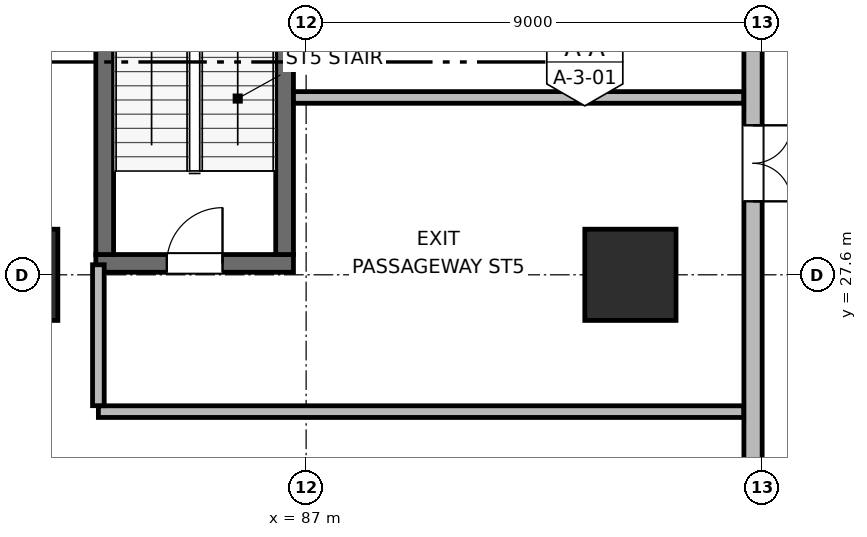
"""IFC4 building model, lengths in metres.
Left out: names, types, materials, properties, quantities, classifications, styles, units other than length and angle.
Written with IfcOpenShell. Run it as: python <this file> out.ifc"""

import sys

from ifc_helpers import new_model, si_unit, direction, frame, frame_2d, origin, origin_2d, place, context, subcontext, project, spatial, rectangle, extrude, element, fill, save


model = new_model("IFC4")
c1 = context("Model", 3, precision=1e-05, world=origin(), true_north=direction((0.0, 1.0)))
c2 = subcontext(c1, "Body", "Model", "MODEL_VIEW")
j1 = project(units=[si_unit("LENGTHUNIT", "METRE"), si_unit("PLANEANGLEUNIT", "RADIAN")], contexts=[c1])
p1 = place(None, origin())
s1 = spatial("IfcSite", under=j1, at=p1, CompositionType="ELEMENT")
p2 = place(p1, origin())
s2 = spatial("IfcBuilding", under=s1, at=p2, CompositionType="ELEMENT")
p3 = place(p2, origin())
s3 = spatial("IfcBuildingStorey", under=s2, at=p3, CompositionType="ELEMENT", Elevation=0.0)
p4 = place(p3, frame((82.85, 27.825, 0.0), z_axis=(0.0, 0.0, 1.0), x_axis=(1.0, 0.0, 0.0)))
e1 = element("IfcWall", 1, at=p4, inside=s3, PredefinedType="SHEAR", context=c2, shape_type="SweptSolid", body=[
    extrude(rectangle(XDim=3.9, YDim=0.35, at=frame_2d((1.95, 0.0))), origin(), (0.0, 0.0, 1.0), 4.5),
])
p5 = place(p4, frame((1.4, 0.0, 0.0)))
e2 = element("IfcOpeningElement", 2, at=p5, cuts=e1, PredefinedType="OPENING", context=c2, shape_type="SweptSolid", body=[
    extrude(rectangle(XDim=1.1, YDim=2.05, at=frame_2d((0.55, 1.025))), frame((0.0, 0.185, 0.0), z_axis=(0.0, -1.0, 0.0), x_axis=(1.0, 0.0, 0.0)), (0.0, 0.0, 1.0), 0.37),
])
for number, where, z_axis, x_axis in (
    (3, (83.025, 28.0, 0.0), (0.0, 0.0, 1.0), (0.0, 1.0, 0.0)),
    (4, (86.575, 28.0, 0.0), (0.0, 0.0, 1.0), (0.0, 1.0, 0.0)),
):
    element("IfcWall", number, at=place(p3, frame(where, z_axis=z_axis, x_axis=x_axis)), inside=s3, PredefinedType="SHEAR", context=c2, shape_type="SweptSolid", body=[
        extrude(rectangle(XDim=8.4, YDim=0.35, at=frame_2d((4.2, 0.0))), origin(), (0.0, 0.0, 1.0), 4.5),
    ])
for number, where, z_axis, x_axis in (
    (5, (81.2, 27.6, 0.0), (0.0, 0.0, 1.0), (1.0, 0.0, 0.0)),
    (6, (93.4, 27.6, 0.0), (0.0, 0.0, 1.0), (1.0, 0.0, 0.0)),
):
    element("IfcColumn", number, at=place(p3, frame(where, z_axis=z_axis, x_axis=x_axis)), inside=s3, PredefinedType="COLUMN", context=c2, shape_type="SweptSolid", body=[
        extrude(rectangle(XDim=1.8, YDim=1.8, at=origin_2d()), origin(), (0.0, 0.0, 1.0), 4.5),
    ])
p6 = place(p3, frame((95.82, 71.64, 0.0), z_axis=(0.0, 0.0, 1.0), x_axis=(0.0, -1.0, 0.0)))
e7 = element("IfcWall", 7, at=p6, inside=s3, PredefinedType="SOLIDWALL", context=c2, shape_type="SweptSolid", body=[
    extrude(rectangle(XDim=71.28, YDim=0.36, at=frame_2d((35.64, 0.0))), origin(), (0.0, 0.0, 1.0), 4.18),
])
p7 = place(p6, frame((12.0, 0.0, 0.0)))
e8 = element("IfcOpeningElement", 8, at=p7, cuts=e7, PredefinedType="OPENING", context=c2, shape_type="SweptSolid", body=[
    extrude(rectangle(XDim=4.2, YDim=2.8, at=frame_2d((2.1, 1.4))), frame((0.0, 0.19, 0.0), z_axis=(0.0, -1.0, 0.0), x_axis=(1.0, 0.0, 0.0)), (0.0, 0.0, 1.0), 0.38),
])
p8 = place(p6, frame((20.0, 0.0, 0.0)))
e9 = element("IfcOpeningElement", 9, at=p8, cuts=e7, PredefinedType="OPENING", context=c2, shape_type="SweptSolid", body=[
    extrude(rectangle(XDim=4.2, YDim=2.8, at=frame_2d((2.1, 1.4))), frame((0.0, 0.19, 0.0), z_axis=(0.0, -1.0, 0.0), x_axis=(1.0, 0.0, 0.0)), (0.0, 0.0, 1.0), 0.38),
])
p9 = place(p6, frame((50.0, 0.0, 0.0)))
e10 = element("IfcOpeningElement", 10, at=p9, cuts=e7, PredefinedType="OPENING", context=c2, shape_type="SweptSolid", body=[
    extrude(rectangle(XDim=4.2, YDim=2.8, at=frame_2d((2.1, 1.4))), frame((0.0, 0.19, 0.0), z_axis=(0.0, -1.0, 0.0), x_axis=(1.0, 0.0, 0.0)), (0.0, 0.0, 1.0), 0.38),
])
p10 = place(p6, frame((58.0, 0.0, 0.0)))
e11 = element("IfcOpeningElement", 11, at=p10, cuts=e7, PredefinedType="OPENING", context=c2, shape_type="SweptSolid", body=[
    extrude(rectangle(XDim=4.2, YDim=2.8, at=frame_2d((2.1, 1.4))), frame((0.0, 0.19, 0.0), z_axis=(0.0, -1.0, 0.0), x_axis=(1.0, 0.0, 0.0)), (0.0, 0.0, 1.0), 0.38),
])
p11 = place(p6, frame((28.29, 0.0, 0.0)))
e12 = element("IfcOpeningElement", 12, at=p11, cuts=e7, PredefinedType="OPENING", context=c2, shape_type="SweptSolid", body=[
    extrude(rectangle(XDim=1.5, YDim=2.15, at=frame_2d((0.75, 1.075))), frame((0.0, 0.19, 0.0), z_axis=(0.0, -1.0, 0.0), x_axis=(1.0, 0.0, 0.0)), (0.0, 0.0, 1.0), 0.38),
])
p12 = place(p6, frame((41.09, 0.0, 0.0)))
e13 = element("IfcOpeningElement", 13, at=p12, cuts=e7, PredefinedType="OPENING", context=c2, shape_type="SweptSolid", body=[
    extrude(rectangle(XDim=1.5, YDim=2.15, at=frame_2d((0.75, 1.075))), frame((0.0, 0.19, 0.0), z_axis=(0.0, -1.0, 0.0), x_axis=(1.0, 0.0, 0.0)), (0.0, 0.0, 1.0), 0.38),
])
p13 = place(p3, frame((82.9, 24.9, 0.0), z_axis=(0.0, 0.0, 1.0), x_axis=(1.0, 0.0, 0.0)))
e14 = element("IfcWall", 14, at=p13, inside=s3, PredefinedType="PARTITIONING", context=c2, shape_type="SweptSolid", body=[
    extrude(rectangle(XDim=12.735, YDim=0.23, at=frame_2d((6.368, 0.0))), origin(), (0.0, 0.0, 1.0), 4.18),
])
p14 = place(p3, frame((82.9, 25.017, 0.0), z_axis=(0.0, 0.0, 1.0), x_axis=(0.0, 1.0, 0.0)))
e15 = element("IfcWall", 15, at=p14, inside=s3, PredefinedType="PARTITIONING", context=c2, shape_type="SweptSolid", body=[
    extrude(rectangle(XDim=2.781, YDim=0.23, at=frame_2d((1.391, 0.0))), origin(), (0.0, 0.0, 1.0), 4.18),
])
p15 = place(p3, frame((86.75, 31.1, 0.0), z_axis=(0.0, 0.0, 1.0), x_axis=(1.0, 0.0, 0.0)))
e16 = element("IfcWall", 16, at=p15, inside=s3, PredefinedType="PARTITIONING", context=c2, shape_type="SweptSolid", body=[
    extrude(rectangle(XDim=8.885, YDim=0.23, at=frame_2d((4.442, 0.0))), origin(), (0.0, 0.0, 1.0), 4.18),
])
p16 = place(p12, origin())
e17 = element("IfcDoor", 17, at=p16, inside=s3, OperationType="DOUBLE_DOOR_SINGLE_SWING", PredefinedType="DOOR", context=c2, shape_type="SweptSolid", body=[
    extrude(rectangle(XDim=1.5, YDim=2.15, at=frame_2d((0.75, 1.075))), frame((0.0, 0.025, 0.0), z_axis=(0.0, -1.0, 0.0), x_axis=(1.0, 0.0, 0.0)), (0.0, 0.0, 1.0), 0.05),
])
fill(e13, e17)
p17 = place(p5, origin())
e18 = element("IfcDoor", 18, at=p17, inside=s3, OperationType="SINGLE_SWING_RIGHT", PredefinedType="DOOR", context=c2, shape_type="SweptSolid", body=[
    extrude(rectangle(XDim=1.1, YDim=2.05, at=frame_2d((0.55, 1.025))), frame((0.0, 0.025, 0.0), z_axis=(0.0, -1.0, 0.0), x_axis=(1.0, 0.0, 0.0)), (0.0, 0.0, 1.0), 0.05),
])
fill(e2, e18)
save(model, sys.argv[1])
